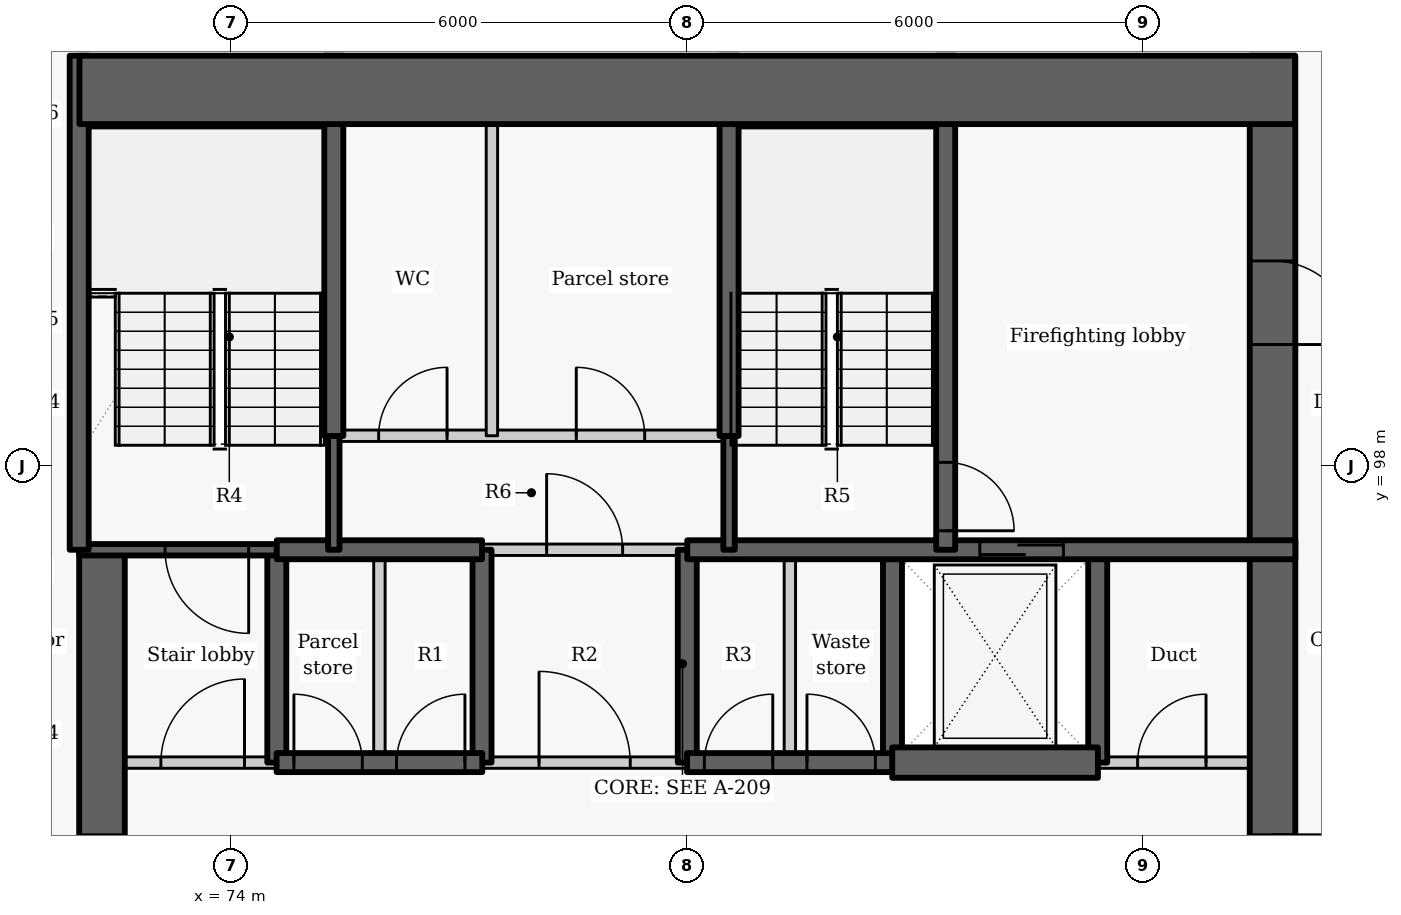
"""IFC4 building model, lengths in metres.
Left out: names, types, materials, properties, quantities, classifications, styles, units other than length and angle.
Written with IfcOpenShell. Run it as: python <this file> out.ifc"""

import sys

from ifc_helpers import new_model, si_unit, direction, frame, frame_2d, origin, place, context, subcontext, project, spatial, rectangle, extrude, element, fill, save


model = new_model("IFC4")
c1 = context("Model", 3, precision=1e-05, world=origin(), true_north=direction((0.0, 1.0)))
c2 = subcontext(c1, "Body", "Model", "MODEL_VIEW")
j1 = project(units=[si_unit("LENGTHUNIT", "METRE"), si_unit("PLANEANGLEUNIT", "RADIAN")], contexts=[c1])
p1 = place(None, origin())
s1 = spatial("IfcSite", under=j1, at=p1, CompositionType="ELEMENT")
p2 = place(p1, origin())
s2 = spatial("IfcBuilding", under=s1, at=p2, CompositionType="ELEMENT")
p3 = place(p2, frame((0.0, 0.0, 34.8)))
s3 = spatial("IfcBuildingStorey", under=s2, at=p3, CompositionType="ELEMENT", Elevation=34.8)
p4 = place(p3, frame((74.6, 94.1, -0.275), z_axis=(0.0, 0.0, 1.0), x_axis=(0.0, 1.0, 0.0)))
e1 = element("IfcWall", 1, at=p4, inside=s3, PredefinedType="SHEAR", context=c2, shape_type="SweptSolid", body=[
    extrude(rectangle(XDim=2.8, YDim=0.25, at=frame_2d((1.4, 0.0))), origin(), (0.0, 0.0, 1.0), 3.175),
])
p5 = place(p3, frame((72.3, 87.8, -0.275), z_axis=(0.0, 0.0, 1.0), x_axis=(0.0, 1.0, 0.0)))
e2 = element("IfcWall", 2, at=p5, inside=s3, PredefinedType="SHEAR", context=c2, shape_type="SweptSolid", body=[
    extrude(rectangle(XDim=9.1, YDim=0.6, at=frame_2d((4.55, 0.0))), origin(), (0.0, 0.0, 1.0), 3.175),
])
p6 = place(p5, frame((3.85, 0.0, 0.275)))
e3 = element("IfcOpeningElement", 3, at=p6, cuts=e2, PredefinedType="OPENING", context=c2, shape_type="SweptSolid", body=[
    extrude(rectangle(XDim=1.5, YDim=2.1, at=frame_2d((0.75, 1.05))), frame((0.0, 0.31, 0.0), z_axis=(0.0, -1.0, 0.0), x_axis=(1.0, 0.0, 0.0)), (0.0, 0.0, 1.0), 0.62),
])
for number, where, z_axis, x_axis in (
    (4, (77.3, 94.1, -0.275), (0.0, 0.0, 1.0), (0.0, 1.0, 0.0)),
    (5, (80.0, 94.1, -0.275), (0.0, 0.0, 1.0), (0.0, 1.0, 0.0)),
    (6, (82.7, 94.1, -0.275), (0.0, 0.0, 1.0), (0.0, 1.0, 0.0)),
    (7, (85.4, 94.1, -0.275), (0.0, 0.0, 1.0), (0.0, 1.0, 0.0)),
):
    element("IfcWall", number, at=place(p3, frame(where, z_axis=z_axis, x_axis=x_axis)), inside=s3, PredefinedType="SHEAR", context=c2, shape_type="SweptSolid", body=[
        extrude(rectangle(XDim=2.8, YDim=0.25, at=frame_2d((1.4, 0.0))), origin(), (0.0, 0.0, 1.0), 3.175),
    ])
p7 = place(p3, frame((87.7, 103.4, -0.275), z_axis=(0.0, 0.0, 1.0), x_axis=(0.0, -1.0, 0.0)))
e8 = element("IfcWall", 8, at=p7, inside=s3, PredefinedType="SHEAR", context=c2, shape_type="SweptSolid", body=[
    extrude(rectangle(XDim=15.6, YDim=0.6, at=frame_2d((7.8, 0.0))), origin(), (0.0, 0.0, 1.0), 3.175),
])
p8 = place(p7, frame((10.25, 0.0, 0.275)))
e9 = element("IfcOpeningElement", 9, at=p8, cuts=e8, PredefinedType="OPENING", context=c2, shape_type="SweptSolid", body=[
    extrude(rectangle(XDim=1.5, YDim=2.1, at=frame_2d((0.75, 1.05))), frame((0.0, 0.31, 0.0), z_axis=(0.0, -1.0, 0.0), x_axis=(1.0, 0.0, 0.0)), (0.0, 0.0, 1.0), 0.62),
])
p9 = place(p7, frame((2.7, 0.0, 0.275)))
e10 = element("IfcOpeningElement", 10, at=p9, cuts=e8, PredefinedType="OPENING", context=c2, shape_type="SweptSolid", body=[
    extrude(rectangle(XDim=1.1, YDim=2.1, at=frame_2d((0.55, 1.05))), frame((0.0, 0.31, 0.0), z_axis=(0.0, -1.0, 0.0), x_axis=(1.0, 0.0, 0.0)), (0.0, 0.0, 1.0), 0.62),
])
p10 = place(p3, frame((72.0, 94.1, 0.0), z_axis=(0.0, 0.0, 1.0), x_axis=(1.0, 0.0, 0.0)))
e11 = element("IfcWall", 11, at=p10, inside=s3, PredefinedType="PARTITIONING", context=c2, shape_type="SweptSolid", body=[
    extrude(rectangle(XDim=2.603, YDim=0.15, at=frame_2d((1.302, 0.0))), origin(), (0.0, 0.0, 1.0), 2.9),
])
p11 = place(p10, frame((1.075, 0.0, 0.0)))
e12 = element("IfcOpeningElement", 12, at=p11, cuts=e11, PredefinedType="OPENING", context=c2, shape_type="SweptSolid", body=[
    extrude(rectangle(XDim=1.1, YDim=2.1, at=frame_2d((0.55, 1.05))), frame((0.0, 0.085, 0.0), z_axis=(0.0, -1.0, 0.0), x_axis=(1.0, 0.0, 0.0)), (0.0, 0.0, 1.0), 0.17),
])
p12 = place(p3, frame((77.297, 94.1, 0.0), z_axis=(0.0, 0.0, 1.0), x_axis=(1.0, 0.0, 0.0)))
e13 = element("IfcWall", 13, at=p12, inside=s3, PredefinedType="PARTITIONING", context=c2, shape_type="SweptSolid", body=[
    extrude(rectangle(XDim=2.706, YDim=0.15, at=frame_2d((1.353, 0.0))), origin(), (0.0, 0.0, 1.0), 2.9),
])
p13 = place(p12, frame((0.753, 0.0, 0.0)))
e14 = element("IfcOpeningElement", 14, at=p13, cuts=e13, PredefinedType="OPENING", context=c2, shape_type="SweptSolid", body=[
    extrude(rectangle(XDim=1.2, YDim=2.1, at=frame_2d((0.6, 1.05))), frame((0.0, 0.085, 0.0), z_axis=(0.0, -1.0, 0.0), x_axis=(1.0, 0.0, 0.0)), (0.0, 0.0, 1.0), 0.17),
])
p14 = place(p3, frame((85.397, 94.1, 0.0), z_axis=(0.0, 0.0, 1.0), x_axis=(1.0, 0.0, 0.0)))
e15 = element("IfcWall", 15, at=p14, inside=s3, PredefinedType="PARTITIONING", context=c2, shape_type="SweptSolid", body=[
    extrude(rectangle(XDim=2.603, YDim=0.15, at=frame_2d((1.302, 0.0))), origin(), (0.0, 0.0, 1.0), 2.9),
])
p15 = place(p14, frame((0.528, 0.0, 0.0)))
e16 = element("IfcOpeningElement", 16, at=p15, cuts=e15, PredefinedType="OPENING", context=c2, shape_type="SweptSolid", body=[
    extrude(rectangle(XDim=0.9, YDim=2.1, at=frame_2d((0.45, 1.05))), frame((0.0, 0.085, 0.0), z_axis=(0.0, -1.0, 0.0), x_axis=(1.0, 0.0, 0.0)), (0.0, 0.0, 1.0), 0.17),
])
p16 = place(p3, frame((74.597, 94.1, -0.275), z_axis=(0.0, 0.0, 1.0), x_axis=(1.0, 0.0, 0.0)))
e17 = element("IfcWall", 17, at=p16, inside=s3, PredefinedType="SHEAR", context=c2, shape_type="SweptSolid", body=[
    extrude(rectangle(XDim=2.706, YDim=0.25, at=frame_2d((1.353, 0.0))), origin(), (0.0, 0.0, 1.0), 3.175),
])
p17 = place(p16, frame((0.228, 0.0, 0.275)))
e18 = element("IfcOpeningElement", 18, at=p17, cuts=e17, PredefinedType="OPENING", context=c2, shape_type="SweptSolid", body=[
    extrude(rectangle(XDim=0.9, YDim=2.1, at=frame_2d((0.45, 1.05))), frame((0.0, 0.135, 0.0), z_axis=(0.0, -1.0, 0.0), x_axis=(1.0, 0.0, 0.0)), (0.0, 0.0, 1.0), 0.27),
])
p18 = place(p16, frame((1.578, 0.0, 0.275)))
e19 = element("IfcOpeningElement", 19, at=p18, cuts=e17, PredefinedType="OPENING", context=c2, shape_type="SweptSolid", body=[
    extrude(rectangle(XDim=0.9, YDim=2.1, at=frame_2d((0.45, 1.05))), frame((0.0, 0.135, 0.0), z_axis=(0.0, -1.0, 0.0), x_axis=(1.0, 0.0, 0.0)), (0.0, 0.0, 1.0), 0.27),
])
p19 = place(p3, frame((79.997, 94.1, -0.275), z_axis=(0.0, 0.0, 1.0), x_axis=(1.0, 0.0, 0.0)))
e20 = element("IfcWall", 20, at=p19, inside=s3, PredefinedType="SHEAR", context=c2, shape_type="SweptSolid", body=[
    extrude(rectangle(XDim=2.706, YDim=0.25, at=frame_2d((1.353, 0.0))), origin(), (0.0, 0.0, 1.0), 3.175),
])
p20 = place(p19, frame((0.228, 0.0, 0.275)))
e21 = element("IfcOpeningElement", 21, at=p20, cuts=e20, PredefinedType="OPENING", context=c2, shape_type="SweptSolid", body=[
    extrude(rectangle(XDim=0.9, YDim=2.1, at=frame_2d((0.45, 1.05))), frame((0.0, 0.135, 0.0), z_axis=(0.0, -1.0, 0.0), x_axis=(1.0, 0.0, 0.0)), (0.0, 0.0, 1.0), 0.27),
])
p21 = place(p19, frame((1.578, 0.0, 0.275)))
e22 = element("IfcOpeningElement", 22, at=p21, cuts=e20, PredefinedType="OPENING", context=c2, shape_type="SweptSolid", body=[
    extrude(rectangle(XDim=0.9, YDim=2.1, at=frame_2d((0.45, 1.05))), frame((0.0, 0.135, 0.0), z_axis=(0.0, -1.0, 0.0), x_axis=(1.0, 0.0, 0.0)), (0.0, 0.0, 1.0), 0.27),
])
p22 = place(p3, frame((82.697, 94.1, -0.275), z_axis=(0.0, 0.0, 1.0), x_axis=(1.0, 0.0, 0.0)))
e23 = element("IfcWall", 23, at=p22, inside=s3, PredefinedType="SHEAR", context=c2, shape_type="SweptSolid", body=[
    extrude(rectangle(XDim=2.706, YDim=0.4, at=frame_2d((1.353, 0.0))), origin(), (0.0, 0.0, 1.0), 3.175),
])
p23 = place(p3, frame((74.6, 96.9, -0.275), z_axis=(0.0, 0.0, 1.0), x_axis=(-1.0, 0.0, 0.0)))
e24 = element("IfcWall", 24, at=p23, inside=s3, PredefinedType="SHEAR", context=c2, shape_type="SweptSolid", body=[
    extrude(rectangle(XDim=2.6, YDim=0.15, at=frame_2d((1.3, 0.0))), origin(), (0.0, 0.0, 1.0), 3.175),
])
p24 = place(p23, frame((0.37, 0.0, 0.275)))
e25 = element("IfcOpeningElement", 25, at=p24, cuts=e24, PredefinedType="OPENING", context=c2, shape_type="SweptSolid", body=[
    extrude(rectangle(XDim=1.1, YDim=2.1, at=frame_2d((0.55, 1.05))), frame((0.0, 0.085, 0.0), z_axis=(0.0, -1.0, 0.0), x_axis=(1.0, 0.0, 0.0)), (0.0, 0.0, 1.0), 0.17),
])
p25 = place(p3, frame((75.95, 94.1, 0.0), z_axis=(0.0, 0.0, 1.0), x_axis=(0.0, 1.0, 0.0)))
e26 = element("IfcWall", 26, at=p25, inside=s3, PredefinedType="PARTITIONING", context=c2, shape_type="SweptSolid", body=[
    extrude(rectangle(XDim=2.8, YDim=0.15, at=frame_2d((1.4, 0.0))), origin(), (0.0, 0.0, 1.0), 2.9),
])
p26 = place(p3, frame((74.6, 96.9, -0.275), z_axis=(0.0, 0.0, 1.0), x_axis=(1.0, 0.0, 0.0)))
e27 = element("IfcWall", 27, at=p26, inside=s3, PredefinedType="SHEAR", context=c2, shape_type="SweptSolid", body=[
    extrude(rectangle(XDim=2.7, YDim=0.25, at=frame_2d((1.35, 0.0))), origin(), (0.0, 0.0, 1.0), 3.175),
])
p27 = place(p3, frame((80.0, 96.9, -0.275), z_axis=(0.0, 0.0, 1.0), x_axis=(1.0, 0.0, 0.0)))
e28 = element("IfcWall", 28, at=p27, inside=s3, PredefinedType="SHEAR", context=c2, shape_type="SweptSolid", body=[
    extrude(rectangle(XDim=8.0, YDim=0.25, at=frame_2d((4.0, 0.0))), origin(), (0.0, 0.0, 1.0), 3.175),
])
p28 = place(p27, frame((3.849, 0.0, 0.275)))
e29 = element("IfcOpeningElement", 29, at=p28, cuts=e28, PredefinedType="OPENING", context=c2, shape_type="SweptSolid", body=[
    extrude(rectangle(XDim=1.1, YDim=2.1, at=frame_2d((0.55, 1.05))), frame((0.0, 0.135, 0.0), z_axis=(0.0, -1.0, 0.0), x_axis=(1.0, 0.0, 0.0)), (0.0, 0.0, 1.0), 0.27),
])
p29 = place(p3, frame((77.3, 96.9, 0.0), z_axis=(0.0, 0.0, 1.0), x_axis=(1.0, 0.0, 0.0)))
e30 = element("IfcWall", 30, at=p29, inside=s3, PredefinedType="PARTITIONING", context=c2, shape_type="SweptSolid", body=[
    extrude(rectangle(XDim=2.7, YDim=0.15, at=frame_2d((1.35, 0.0))), origin(), (0.0, 0.0, 1.0), 2.9),
])
p30 = place(p29, frame((0.85, 0.0, 0.0)))
e31 = element("IfcOpeningElement", 31, at=p30, cuts=e30, PredefinedType="OPENING", context=c2, shape_type="SweptSolid", body=[
    extrude(rectangle(XDim=1.0, YDim=2.1, at=frame_2d((0.5, 1.05))), frame((0.0, 0.085, 0.0), z_axis=(0.0, -1.0, 0.0), x_axis=(1.0, 0.0, 0.0)), (0.0, 0.0, 1.0), 0.17),
])
p31 = place(p3, frame((81.35, 94.1, 0.0), z_axis=(0.0, 0.0, 1.0), x_axis=(0.0, 1.0, 0.0)))
e32 = element("IfcWall", 32, at=p31, inside=s3, PredefinedType="PARTITIONING", context=c2, shape_type="SweptSolid", body=[
    extrude(rectangle(XDim=2.8, YDim=0.15, at=frame_2d((1.4, 0.0))), origin(), (0.0, 0.0, 1.0), 2.9),
])
p32 = place(p3, frame((75.35, 96.9, -0.275), z_axis=(0.0, 0.0, 1.0), x_axis=(0.0, 1.0, 0.0)))
e33 = element("IfcWall", 33, at=p32, inside=s3, PredefinedType="SHEAR", context=c2, shape_type="SweptSolid", body=[
    extrude(rectangle(XDim=1.503, YDim=0.15, at=frame_2d((0.751, 0.0))), origin(), (0.0, 0.0, 1.0), 3.175),
])
p33 = place(p3, frame((75.35, 98.397, -0.275), z_axis=(0.0, 0.0, 1.0), x_axis=(0.0, 1.0, 0.0)))
e34 = element("IfcWall", 34, at=p33, inside=s3, PredefinedType="SHEAR", context=c2, shape_type="SweptSolid", body=[
    extrude(rectangle(XDim=5.003, YDim=0.25, at=frame_2d((2.501, 0.0))), origin(), (0.0, 0.0, 1.0), 3.175),
])
p34 = place(p3, frame((72.0, 96.9, -0.275), z_axis=(0.0, 0.0, 1.0), x_axis=(0.0, 1.0, 0.0)))
e35 = element("IfcWall", 35, at=p34, inside=s3, PredefinedType="SHEAR", context=c2, shape_type="SweptSolid", body=[
    extrude(rectangle(XDim=6.5, YDim=0.25, at=frame_2d((3.25, 0.0))), origin(), (0.0, 0.0, 1.0), 3.175),
])
p35 = place(p3, frame((83.4, 103.4, -0.275), z_axis=(0.0, 0.0, 1.0), x_axis=(0.0, -1.0, 0.0)))
e36 = element("IfcWall", 36, at=p35, inside=s3, PredefinedType="SHEAR", context=c2, shape_type="SweptSolid", body=[
    extrude(rectangle(XDim=6.5, YDim=0.25, at=frame_2d((3.25, 0.0))), origin(), (0.0, 0.0, 1.0), 3.175),
])
p36 = place(p35, frame((5.35, 0.0, 0.275)))
e37 = element("IfcOpeningElement", 37, at=p36, cuts=e36, PredefinedType="OPENING", context=c2, shape_type="SweptSolid", body=[
    extrude(rectangle(XDim=0.9, YDim=2.1, at=frame_2d((0.45, 1.05))), frame((0.0, 0.135, 0.0), z_axis=(0.0, -1.0, 0.0), x_axis=(1.0, 0.0, 0.0)), (0.0, 0.0, 1.0), 0.27),
])
p37 = place(p3, frame((80.55, 96.9, -0.275), z_axis=(0.0, 0.0, 1.0), x_axis=(0.0, 1.0, 0.0)))
e38 = element("IfcWall", 38, at=p37, inside=s3, PredefinedType="SHEAR", context=c2, shape_type="SweptSolid", body=[
    extrude(rectangle(XDim=1.503, YDim=0.15, at=frame_2d((0.751, 0.0))), origin(), (0.0, 0.0, 1.0), 3.175),
])
p38 = place(p3, frame((80.55, 98.397, -0.275), z_axis=(0.0, 0.0, 1.0), x_axis=(0.0, 1.0, 0.0)))
e39 = element("IfcWall", 39, at=p38, inside=s3, PredefinedType="SHEAR", context=c2, shape_type="SweptSolid", body=[
    extrude(rectangle(XDim=5.003, YDim=0.25, at=frame_2d((2.501, 0.0))), origin(), (0.0, 0.0, 1.0), 3.175),
])
p39 = place(p3, frame((75.35, 98.4, 0.0), z_axis=(0.0, 0.0, 1.0), x_axis=(1.0, 0.0, 0.0)))
e40 = element("IfcWall", 40, at=p39, inside=s3, PredefinedType="PARTITIONING", context=c2, shape_type="SweptSolid", body=[
    extrude(rectangle(XDim=5.2, YDim=0.15, at=frame_2d((2.6, 0.0))), origin(), (0.0, 0.0, 1.0), 2.9),
])
p40 = place(p39, frame((0.59, 0.0, 0.0)))
e41 = element("IfcOpeningElement", 41, at=p40, cuts=e40, PredefinedType="OPENING", context=c2, shape_type="SweptSolid", body=[
    extrude(rectangle(XDim=0.9, YDim=2.1, at=frame_2d((0.45, 1.05))), frame((0.0, 0.085, 0.0), z_axis=(0.0, -1.0, 0.0), x_axis=(1.0, 0.0, 0.0)), (0.0, 0.0, 1.0), 0.17),
])
p41 = place(p39, frame((3.19, 0.0, 0.0)))
e42 = element("IfcOpeningElement", 42, at=p41, cuts=e40, PredefinedType="OPENING", context=c2, shape_type="SweptSolid", body=[
    extrude(rectangle(XDim=0.9, YDim=2.1, at=frame_2d((0.45, 1.05))), frame((0.0, 0.085, 0.0), z_axis=(0.0, -1.0, 0.0), x_axis=(1.0, 0.0, 0.0)), (0.0, 0.0, 1.0), 0.17),
])
p42 = place(p3, frame((77.43, 98.4, 0.0), z_axis=(0.0, 0.0, 1.0), x_axis=(0.0, 1.0, 0.0)))
e43 = element("IfcWall", 43, at=p42, inside=s3, PredefinedType="PARTITIONING", context=c2, shape_type="SweptSolid", body=[
    extrude(rectangle(XDim=5.0, YDim=0.15, at=frame_2d((2.5, 0.0))), origin(), (0.0, 0.0, 1.0), 2.9),
])
p43 = place(p3, frame((72.004, 102.95, -0.275), z_axis=(0.0, 0.0, 1.0), x_axis=(1.0, 0.0, 0.0)))
e44 = element("IfcWall", 44, at=p43, inside=s3, PredefinedType="SHEAR", context=c2, shape_type="SweptSolid", body=[
    extrude(rectangle(XDim=15.992, YDim=0.9, at=frame_2d((7.996, 0.0))), origin(), (0.0, 0.0, 1.0), 3.175),
])
p44 = place(p11, origin())
e45 = element("IfcDoor", 45, at=p44, inside=s3, OperationType="SINGLE_SWING_RIGHT", PredefinedType="DOOR", context=c2, shape_type="SweptSolid", body=[
    extrude(rectangle(XDim=1.1, YDim=2.1, at=frame_2d((0.55, 1.05))), frame((0.0, 0.025, 0.0), z_axis=(0.0, -1.0, 0.0), x_axis=(1.0, 0.0, 0.0)), (0.0, 0.0, 1.0), 0.05),
])
fill(e12, e45)
p45 = place(p17, origin())
e46 = element("IfcDoor", 46, at=p45, inside=s3, OperationType="SINGLE_SWING_LEFT", PredefinedType="DOOR", context=c2, shape_type="SweptSolid", body=[
    extrude(rectangle(XDim=0.9, YDim=2.1, at=frame_2d((0.45, 1.05))), frame((0.0, 0.025, 0.0), z_axis=(0.0, -1.0, 0.0), x_axis=(1.0, 0.0, 0.0)), (0.0, 0.0, 1.0), 0.05),
])
fill(e18, e46)
p46 = place(p18, origin())
e47 = element("IfcDoor", 47, at=p46, inside=s3, OperationType="SINGLE_SWING_RIGHT", PredefinedType="DOOR", context=c2, shape_type="SweptSolid", body=[
    extrude(rectangle(XDim=0.9, YDim=2.1, at=frame_2d((0.45, 1.05))), frame((0.0, 0.025, 0.0), z_axis=(0.0, -1.0, 0.0), x_axis=(1.0, 0.0, 0.0)), (0.0, 0.0, 1.0), 0.05),
])
fill(e19, e47)
p47 = place(p13, origin())
e48 = element("IfcDoor", 48, at=p47, inside=s3, OperationType="DOUBLE_DOOR_SINGLE_SWING", PredefinedType="DOOR", context=c2, shape_type="SweptSolid", body=[
    extrude(rectangle(XDim=1.2, YDim=2.1, at=frame_2d((0.6, 1.05))), frame((0.0, 0.025, 0.0), z_axis=(0.0, -1.0, 0.0), x_axis=(1.0, 0.0, 0.0)), (0.0, 0.0, 1.0), 0.05),
])
fill(e14, e48)
p48 = place(p20, origin())
e49 = element("IfcDoor", 49, at=p48, inside=s3, OperationType="SINGLE_SWING_RIGHT", PredefinedType="DOOR", context=c2, shape_type="SweptSolid", body=[
    extrude(rectangle(XDim=0.9, YDim=2.1, at=frame_2d((0.45, 1.05))), frame((0.0, 0.025, 0.0), z_axis=(0.0, -1.0, 0.0), x_axis=(1.0, 0.0, 0.0)), (0.0, 0.0, 1.0), 0.05),
])
fill(e21, e49)
p49 = place(p21, origin())
e50 = element("IfcDoor", 50, at=p49, inside=s3, OperationType="SINGLE_SWING_LEFT", PredefinedType="DOOR", context=c2, shape_type="SweptSolid", body=[
    extrude(rectangle(XDim=0.9, YDim=2.1, at=frame_2d((0.45, 1.05))), frame((0.0, 0.025, 0.0), z_axis=(0.0, -1.0, 0.0), x_axis=(1.0, 0.0, 0.0)), (0.0, 0.0, 1.0), 0.05),
])
fill(e22, e50)
p50 = place(p28, origin())
e51 = element("IfcDoor", 51, at=p50, inside=s3, OperationType="SLIDING_TO_LEFT", PredefinedType="DOOR", context=c2, shape_type="SweptSolid", body=[
    extrude(rectangle(XDim=1.1, YDim=2.1, at=frame_2d((0.55, 1.05))), frame((0.0, 0.025, 0.0), z_axis=(0.0, -1.0, 0.0), x_axis=(1.0, 0.0, 0.0)), (0.0, 0.0, 1.0), 0.05),
])
fill(e29, e51)
p51 = place(p15, origin())
e52 = element("IfcDoor", 52, at=p51, inside=s3, OperationType="SINGLE_SWING_RIGHT", PredefinedType="DOOR", context=c2, shape_type="SweptSolid", body=[
    extrude(rectangle(XDim=0.9, YDim=2.1, at=frame_2d((0.45, 1.05))), frame((0.0, 0.025, 0.0), z_axis=(0.0, -1.0, 0.0), x_axis=(1.0, 0.0, 0.0)), (0.0, 0.0, 1.0), 0.05),
])
fill(e16, e52)
p52 = place(p30, origin())
e53 = element("IfcDoor", 53, at=p52, inside=s3, OperationType="SINGLE_SWING_LEFT", PredefinedType="DOOR", context=c2, shape_type="SweptSolid", body=[
    extrude(rectangle(XDim=1.0, YDim=2.1, at=frame_2d((0.5, 1.05))), frame((0.0, 0.025, 0.0), z_axis=(0.0, -1.0, 0.0), x_axis=(1.0, 0.0, 0.0)), (0.0, 0.0, 1.0), 0.05),
])
fill(e31, e53)
p53 = place(p40, origin())
e54 = element("IfcDoor", 54, at=p53, inside=s3, OperationType="SINGLE_SWING_RIGHT", PredefinedType="DOOR", context=c2, shape_type="SweptSolid", body=[
    extrude(rectangle(XDim=0.9, YDim=2.1, at=frame_2d((0.45, 1.05))), frame((0.0, 0.025, 0.0), z_axis=(0.0, -1.0, 0.0), x_axis=(1.0, 0.0, 0.0)), (0.0, 0.0, 1.0), 0.05),
])
fill(e41, e54)
p54 = place(p41, origin())
e55 = element("IfcDoor", 55, at=p54, inside=s3, OperationType="SINGLE_SWING_LEFT", PredefinedType="DOOR", context=c2, shape_type="SweptSolid", body=[
    extrude(rectangle(XDim=0.9, YDim=2.1, at=frame_2d((0.45, 1.05))), frame((0.0, 0.025, 0.0), z_axis=(0.0, -1.0, 0.0), x_axis=(1.0, 0.0, 0.0)), (0.0, 0.0, 1.0), 0.05),
])
fill(e42, e55)
p55 = place(p24, origin())
e56 = element("IfcDoor", 56, at=p55, inside=s3, OperationType="SINGLE_SWING_LEFT", PredefinedType="DOOR", context=c2, shape_type="SweptSolid", body=[
    extrude(rectangle(XDim=1.1, YDim=2.1, at=frame_2d((0.55, 1.05))), frame((0.0, 0.025, 0.0), z_axis=(0.0, -1.0, 0.0), x_axis=(1.0, 0.0, 0.0)), (0.0, 0.0, 1.0), 0.05),
])
fill(e25, e56)
p56 = place(p36, origin())
e57 = element("IfcDoor", 57, at=p56, inside=s3, OperationType="SINGLE_SWING_RIGHT", PredefinedType="DOOR", context=c2, shape_type="SweptSolid", body=[
    extrude(rectangle(XDim=0.9, YDim=2.1, at=frame_2d((0.45, 1.05))), frame((0.0, 0.025, 0.0), z_axis=(0.0, -1.0, 0.0), x_axis=(1.0, 0.0, 0.0)), (0.0, 0.0, 1.0), 0.05),
])
fill(e37, e57)
p57 = place(p6, origin())
e58 = element("IfcDoor", 58, at=p57, inside=s3, OperationType="DOUBLE_DOOR_SINGLE_SWING", PredefinedType="DOOR", context=c2, shape_type="SweptSolid", body=[
    extrude(rectangle(XDim=1.5, YDim=2.1, at=frame_2d((0.75, 1.05))), frame((0.0, 0.025, 0.0), z_axis=(0.0, -1.0, 0.0), x_axis=(1.0, 0.0, 0.0)), (0.0, 0.0, 1.0), 0.05),
])
fill(e3, e58)
p58 = place(p9, origin())
e59 = element("IfcDoor", 59, at=p58, inside=s3, OperationType="SINGLE_SWING_RIGHT", PredefinedType="DOOR", context=c2, shape_type="SweptSolid", body=[
    extrude(rectangle(XDim=1.1, YDim=2.1, at=frame_2d((0.55, 1.05))), frame((0.0, 0.025, 0.0), z_axis=(0.0, -1.0, 0.0), x_axis=(1.0, 0.0, 0.0)), (0.0, 0.0, 1.0), 0.05),
])
fill(e10, e59)
save(model, sys.argv[1])
